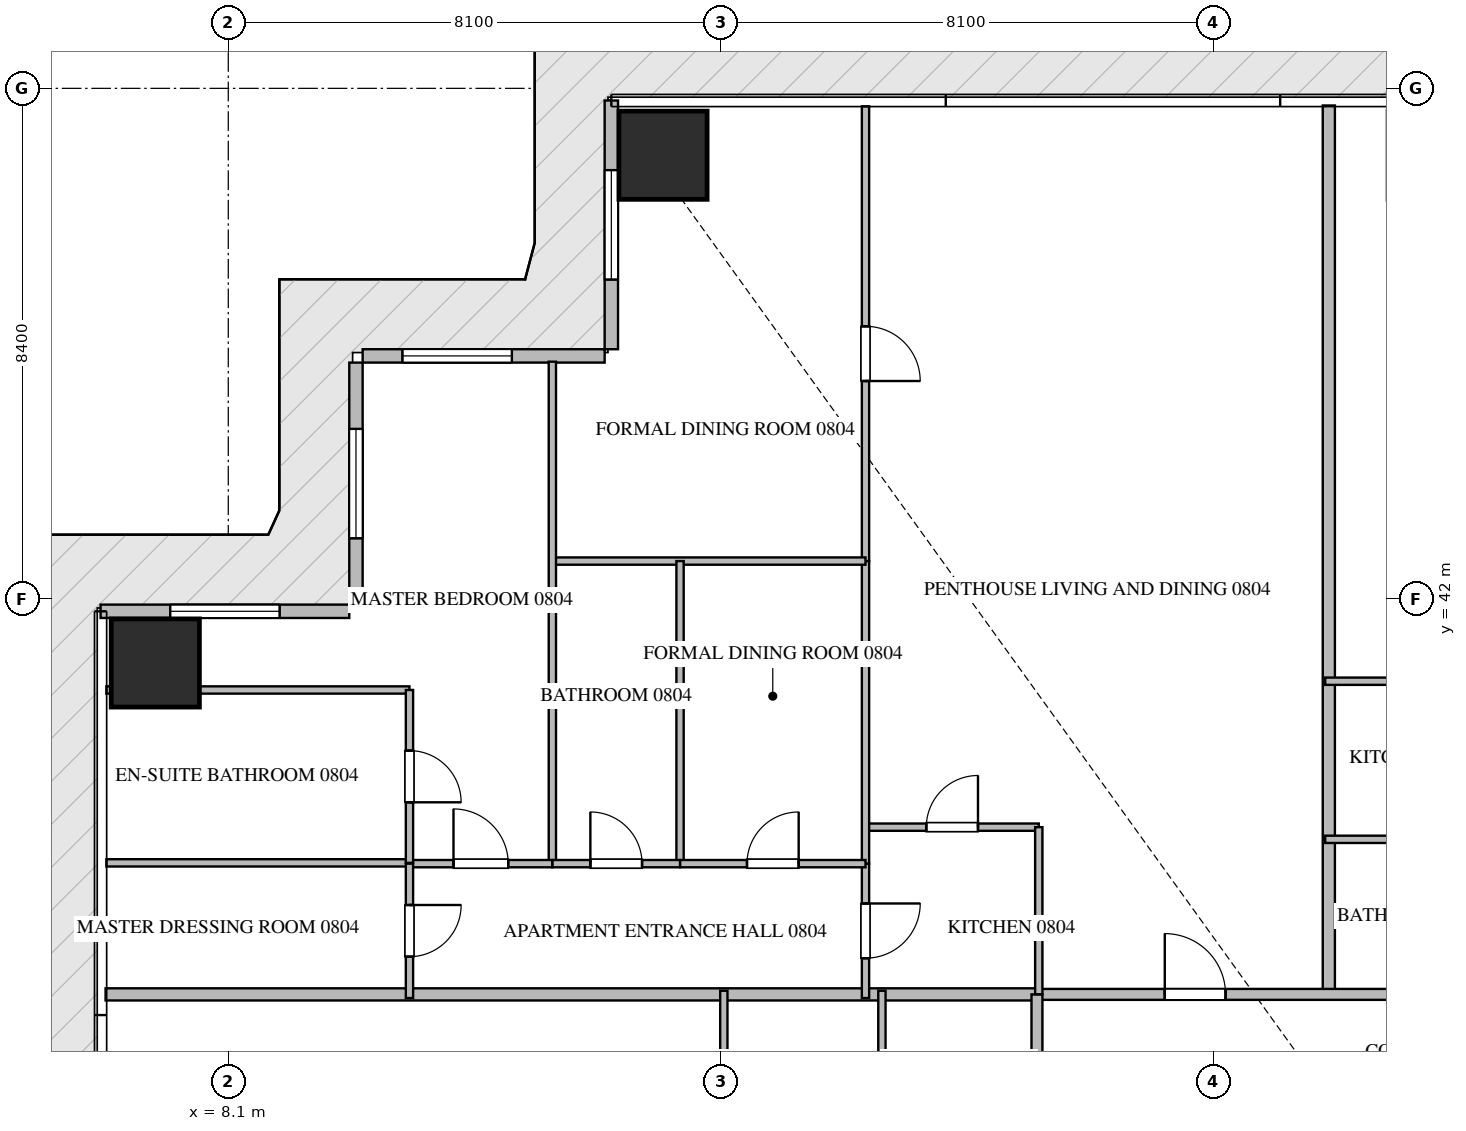
"""IFC4 building model, lengths in metres.
Left out: names, types, materials, properties, quantities, classifications, styles, units other than length and angle.
Written with IfcOpenShell. Run it as: python <this file> out.ifc"""

import sys

from ifc_helpers import new_model, si_unit, direction, frame, frame_2d, origin, origin_2d, place, context, subcontext, project, spatial, rectangle, extrude, source, transform, mapped, element, fill, save


model = new_model("IFC4")
c1 = context("Model", 3, precision=1e-05, world=origin(), true_north=direction((0.0, 1.0)))
c2 = subcontext(c1, "Body", "Model", "MODEL_VIEW")
j1 = project(units=[si_unit("LENGTHUNIT", "METRE"), si_unit("PLANEANGLEUNIT", "RADIAN")], contexts=[c1])
p1 = place(None, origin())
s1 = spatial("IfcSite", under=j1, at=p1, CompositionType="ELEMENT")
p2 = place(p1, origin())
s2 = spatial("IfcBuilding", under=s1, at=p2, CompositionType="ELEMENT")
p3 = place(p2, frame((0.0, 0.0, 37.95)))
s3 = spatial("IfcBuildingStorey", under=s2, at=p3, CompositionType="ELEMENT", Elevation=37.95)
m1 = source(origin(), c2, "Body", "SweptSolid", [
    extrude(rectangle(XDim=1.45, YDim=1.45, at=origin_2d()), origin(), (0.0, 0.0, 1.0), 3.75),
])
for number, where, z_axis, x_axis in (
    (1, (15.25, 49.3, -0.26), (0.0, 0.0, 1.0), (1.0, 0.0, 0.0)),
    (2, (6.9, 40.95, -0.26), (0.0, 0.0, 1.0), (1.0, 0.0, 0.0)),
):
    element("IfcColumn", number, at=place(p3, frame(where, z_axis=z_axis, x_axis=x_axis)), inside=s3, PredefinedType="COLUMN", context=c2, shape_type="MappedRepresentation", body=[
        mapped(m1, transform((0.0, 0.0, 0.0), scale=1.0)),
    ])
p4 = place(p3, frame((14.4, 50.2, 0.0), z_axis=(0.0, 0.0, 1.0), x_axis=(0.0, -1.0, 0.0)))
e3 = element("IfcWall", 3, at=p4, inside=s3, PredefinedType="ELEMENTEDWALL", context=c2, shape_type="SweptSolid", body=[
    extrude(rectangle(XDim=4.09, YDim=0.22, at=frame_2d((2.045, 0.0))), origin(), (0.0, 0.0, 1.0), 3.475),
])
p5 = place(p4, frame((1.145, 0.0, 0.65)))
e4 = element("IfcOpeningElement", 4, at=p5, cuts=e3, PredefinedType="OPENING", context=c2, shape_type="SweptSolid", body=[
    extrude(rectangle(XDim=1.8, YDim=2.1, at=frame_2d((0.9, 1.05))), frame((0.0, 0.12, 0.0), z_axis=(0.0, -1.0, 0.0), x_axis=(1.0, 0.0, 0.0)), (0.0, 0.0, 1.0), 0.24),
])
p6 = place(p3, frame((14.29, 46.0, 0.0), z_axis=(0.0, 0.0, 1.0), x_axis=(-1.0, 0.0, 0.0)))
e5 = element("IfcWall", 5, at=p6, inside=s3, PredefinedType="ELEMENTEDWALL", context=c2, shape_type="SweptSolid", body=[
    extrude(rectangle(XDim=3.98, YDim=0.22, at=frame_2d((1.99, 0.0))), origin(), (0.0, 0.0, 1.0), 3.475),
])
p7 = place(p6, frame((1.526, 0.0, 0.65)))
e6 = element("IfcOpeningElement", 6, at=p7, cuts=e5, PredefinedType="OPENING", context=c2, shape_type="SweptSolid", body=[
    extrude(rectangle(XDim=1.8, YDim=2.1, at=frame_2d((0.9, 1.05))), frame((0.0, 0.12, 0.0), z_axis=(0.0, -1.0, 0.0), x_axis=(1.0, 0.0, 0.0)), (0.0, 0.0, 1.0), 0.24),
])
p8 = place(p3, frame((10.2, 45.89, 0.0), z_axis=(0.0, 0.0, 1.0), x_axis=(0.0, -1.0, 0.0)))
e7 = element("IfcWall", 7, at=p8, inside=s3, PredefinedType="ELEMENTEDWALL", context=c2, shape_type="SweptSolid", body=[
    extrude(rectangle(XDim=3.98, YDim=0.22, at=frame_2d((1.99, 0.0))), origin(), (0.0, 0.0, 1.0), 3.475),
])
p9 = place(p8, frame((1.09, 0.0, 0.65)))
e8 = element("IfcOpeningElement", 8, at=p9, cuts=e7, PredefinedType="OPENING", context=c2, shape_type="SweptSolid", body=[
    extrude(rectangle(XDim=1.8, YDim=2.1, at=frame_2d((0.9, 1.05))), frame((0.0, 0.12, 0.0), z_axis=(0.0, -1.0, 0.0), x_axis=(1.0, 0.0, 0.0)), (0.0, 0.0, 1.0), 0.24),
])
p10 = place(p3, frame((10.09, 41.8, 0.0), z_axis=(0.0, 0.0, 1.0), x_axis=(-1.0, 0.0, 0.0)))
e9 = element("IfcWall", 9, at=p10, inside=s3, PredefinedType="ELEMENTEDWALL", context=c2, shape_type="SweptSolid", body=[
    extrude(rectangle(XDim=4.09, YDim=0.22, at=frame_2d((2.045, 0.0))), origin(), (0.0, 0.0, 1.0), 3.475),
])
p11 = place(p10, frame((1.145, 0.0, 0.65)))
e10 = element("IfcOpeningElement", 10, at=p11, cuts=e9, PredefinedType="OPENING", context=c2, shape_type="SweptSolid", body=[
    extrude(rectangle(XDim=1.8, YDim=2.1, at=frame_2d((0.9, 1.05))), frame((0.0, 0.12, 0.0), z_axis=(0.0, -1.0, 0.0), x_axis=(1.0, 0.0, 0.0)), (0.0, 0.0, 1.0), 0.24),
])
p12 = place(p3, frame((26.2, 35.5, 0.0), z_axis=(0.0, 0.0, 1.0), x_axis=(0.0, 1.0, 0.0)))
e11 = element("IfcWall", 11, at=p12, inside=s3, PredefinedType="PARTITIONING", context=c2, shape_type="SweptSolid", body=[
    extrude(rectangle(XDim=14.618, YDim=0.2, at=frame_2d((7.309, 0.0))), origin(), (0.0, 0.0, 1.0), 3.49),
])
p13 = place(p3, frame((6.082, 35.5, 0.0), z_axis=(0.0, 0.0, 1.0), x_axis=(1.0, 0.0, 0.0)))
e12 = element("IfcWall", 12, at=p13, inside=s3, PredefinedType="PARTITIONING", context=c2, shape_type="SweptSolid", body=[
    extrude(rectangle(XDim=15.318, YDim=0.2, at=frame_2d((7.659, 0.0))), origin(), (0.0, 0.0, 1.0), 3.49),
])
p14 = place(p3, frame((21.402, 35.5, 0.0), z_axis=(0.0, 0.0, 1.0), x_axis=(1.0, 0.0, 0.0)))
e13 = element("IfcWall", 13, at=p14, inside=s3, PredefinedType="PARTITIONING", context=c2, shape_type="SweptSolid", body=[
    extrude(rectangle(XDim=21.996, YDim=0.18, at=frame_2d((10.998, 0.0))), origin(), (0.0, 0.0, 1.0), 3.49),
])
p15 = place(p14, frame((2.1, 0.0, 0.0)))
e14 = element("IfcOpeningElement", 14, at=p15, cuts=e13, PredefinedType="OPENING", context=c2, shape_type="SweptSolid", body=[
    extrude(rectangle(XDim=1.0, YDim=2.15, at=frame_2d((0.5, 1.075))), frame((0.0, 0.1, 0.0), z_axis=(0.0, -1.0, 0.0), x_axis=(1.0, 0.0, 0.0)), (0.0, 0.0, 1.0), 0.2),
])
p16 = place(p14, frame((10.498, 0.0, 0.0)))
e15 = element("IfcOpeningElement", 15, at=p16, cuts=e13, PredefinedType="OPENING", context=c2, shape_type="SweptSolid", body=[
    extrude(rectangle(XDim=1.0, YDim=2.15, at=frame_2d((0.5, 1.075))), frame((0.0, 0.1, 0.0), z_axis=(0.0, -1.0, 0.0), x_axis=(1.0, 0.0, 0.0)), (0.0, 0.0, 1.0), 0.2),
])
p17 = place(p14, frame((16.272, 0.0, 0.0)))
e16 = element("IfcOpeningElement", 16, at=p17, cuts=e13, PredefinedType="OPENING", context=c2, shape_type="SweptSolid", body=[
    extrude(rectangle(XDim=1.0, YDim=2.15, at=frame_2d((0.5, 1.075))), frame((0.0, 0.1, 0.0), z_axis=(0.0, -1.0, 0.0), x_axis=(1.0, 0.0, 0.0)), (0.0, 0.0, 1.0), 0.2),
])
p18 = place(p3, frame((21.4, 14.9, 0.0), z_axis=(0.0, 0.0, 1.0), x_axis=(0.0, 1.0, 0.0)))
e17 = element("IfcWall", 17, at=p18, inside=s3, PredefinedType="PARTITIONING", context=c2, shape_type="SweptSolid", body=[
    extrude(rectangle(XDim=20.6, YDim=0.18, at=frame_2d((10.3, 0.0))), origin(), (0.0, 0.0, 1.0), 3.49),
])
p19 = place(p18, frame((1.96, 0.0, 0.0)))
e18 = element("IfcOpeningElement", 18, at=p19, cuts=e17, PredefinedType="OPENING", context=c2, shape_type="SweptSolid", body=[
    extrude(rectangle(XDim=1.0, YDim=2.15, at=frame_2d((0.5, 1.075))), frame((0.0, 0.1, 0.0), z_axis=(0.0, -1.0, 0.0), x_axis=(1.0, 0.0, 0.0)), (0.0, 0.0, 1.0), 0.2),
])
p20 = place(p18, frame((13.583, 0.0, 0.0)))
e19 = element("IfcOpeningElement", 19, at=p20, cuts=e17, PredefinedType="OPENING", context=c2, shape_type="SweptSolid", body=[
    extrude(rectangle(XDim=1.0, YDim=2.15, at=frame_2d((0.5, 1.075))), frame((0.0, 0.1, 0.0), z_axis=(0.0, -1.0, 0.0), x_axis=(1.0, 0.0, 0.0)), (0.0, 0.0, 1.0), 0.2),
])
p21 = place(p3, frame((18.58, 38.25, 0.0), z_axis=(0.0, 0.0, 1.0), x_axis=(1.0, 0.0, 0.0)))
e20 = element("IfcWall", 20, at=p21, inside=s3, PredefinedType="PARTITIONING", context=c2, shape_type="SweptSolid", body=[
    extrude(rectangle(XDim=2.85, YDim=0.12, at=frame_2d((1.425, 0.0))), origin(), (0.0, 0.0, 1.0), 3.49),
])
p22 = place(p21, frame((1.0, 0.0, 0.0)))
e21 = element("IfcOpeningElement", 21, at=p22, cuts=e20, PredefinedType="OPENING", context=c2, shape_type="SweptSolid", body=[
    extrude(rectangle(XDim=0.85, YDim=2.1, at=frame_2d((0.425, 1.05))), frame((0.0, 0.07, 0.0), z_axis=(0.0, -1.0, 0.0), x_axis=(1.0, 0.0, 0.0)), (0.0, 0.0, 1.0), 0.14),
])
p23 = place(p3, frame((21.43, 38.25, 0.0), z_axis=(0.0, 0.0, 1.0), x_axis=(0.0, -1.0, 0.0)))
e22 = element("IfcWall", 22, at=p23, inside=s3, PredefinedType="PARTITIONING", context=c2, shape_type="SweptSolid", body=[
    extrude(rectangle(XDim=2.748, YDim=0.12, at=frame_2d((1.374, 0.0))), origin(), (0.0, 0.0, 1.0), 3.49),
])
p24 = place(p3, frame((18.58, 37.65, 0.0), z_axis=(0.0, 0.0, 1.0), x_axis=(0.0, -1.0, 0.0)))
e23 = element("IfcWall", 23, at=p24, inside=s3, PredefinedType="PARTITIONING", context=c2, shape_type="SweptSolid", body=[
    extrude(rectangle(XDim=2.21, YDim=0.12, at=frame_2d((1.105, 0.0))), origin(), (0.0, 0.0, 1.0), 3.49),
])
p25 = place(p24, frame((0.655, 0.0, 0.0)))
e24 = element("IfcOpeningElement", 24, at=p25, cuts=e23, PredefinedType="OPENING", context=c2, shape_type="SweptSolid", body=[
    extrude(rectangle(XDim=0.9, YDim=2.1, at=frame_2d((0.45, 1.05))), frame((0.0, 0.07, 0.0), z_axis=(0.0, -1.0, 0.0), x_axis=(1.0, 0.0, 0.0)), (0.0, 0.0, 1.0), 0.14),
])
p26 = place(p3, frame((18.58, 50.105, 0.0), z_axis=(0.0, 0.0, 1.0), x_axis=(0.0, -1.0, 0.0)))
e25 = element("IfcWall", 25, at=p26, inside=s3, PredefinedType="PARTITIONING", context=c2, shape_type="SweptSolid", body=[
    extrude(rectangle(XDim=7.479, YDim=0.12, at=frame_2d((3.74, 0.0))), origin(), (0.0, 0.0, 1.0), 3.49),
])
p27 = place(p26, frame((3.618, 0.0, 0.0)))
e26 = element("IfcOpeningElement", 26, at=p27, cuts=e25, PredefinedType="OPENING", context=c2, shape_type="SweptSolid", body=[
    extrude(rectangle(XDim=0.9, YDim=2.1, at=frame_2d((0.45, 1.05))), frame((0.0, 0.07, 0.0), z_axis=(0.0, -1.0, 0.0), x_axis=(1.0, 0.0, 0.0)), (0.0, 0.0, 1.0), 0.14),
])
p28 = place(p3, frame((18.58, 42.624, 0.0), z_axis=(0.0, 0.0, 1.0), x_axis=(0.0, -1.0, 0.0)))
e27 = element("IfcWall", 27, at=p28, inside=s3, PredefinedType="PARTITIONING", context=c2, shape_type="SweptSolid", body=[
    extrude(rectangle(XDim=4.972, YDim=0.12, at=frame_2d((2.486, 0.0))), origin(), (0.0, 0.0, 1.0), 3.49),
])
p29 = place(p3, frame((13.43, 42.626, 0.0), z_axis=(0.0, 0.0, 1.0), x_axis=(1.0, 0.0, 0.0)))
e28 = element("IfcWall", 28, at=p29, inside=s3, PredefinedType="PARTITIONING", context=c2, shape_type="SweptSolid", body=[
    extrude(rectangle(XDim=5.15, YDim=0.12, at=frame_2d((2.575, 0.0))), origin(), (0.0, 0.0, 1.0), 3.49),
])
p30 = place(p3, frame((13.43, 45.905, 0.0), z_axis=(0.0, 0.0, 1.0), x_axis=(0.0, -1.0, 0.0)))
e29 = element("IfcWall", 29, at=p30, inside=s3, PredefinedType="PARTITIONING", context=c2, shape_type="SweptSolid", body=[
    extrude(rectangle(XDim=8.255, YDim=0.12, at=frame_2d((4.127, 0.0))), origin(), (0.0, 0.0, 1.0), 3.49),
])
p31 = place(p3, frame((15.53, 42.626, 0.0), z_axis=(0.0, 0.0, 1.0), x_axis=(0.0, -1.0, 0.0)))
e30 = element("IfcWall", 30, at=p31, inside=s3, PredefinedType="PARTITIONING", context=c2, shape_type="SweptSolid", body=[
    extrude(rectangle(XDim=4.976, YDim=0.12, at=frame_2d((2.488, 0.0))), origin(), (0.0, 0.0, 1.0), 3.49),
])
p32 = place(p3, frame((13.43, 37.65, 0.0), z_axis=(0.0, 0.0, 1.0), x_axis=(1.0, 0.0, 0.0)))
e31 = element("IfcWall", 31, at=p32, inside=s3, PredefinedType="PARTITIONING", context=c2, shape_type="SweptSolid", body=[
    extrude(rectangle(XDim=2.1, YDim=0.12, at=frame_2d((1.05, 0.0))), origin(), (0.0, 0.0, 1.0), 3.49),
])
p33 = place(p32, frame((0.625, 0.0, 0.0)))
e32 = element("IfcOpeningElement", 32, at=p33, cuts=e31, PredefinedType="OPENING", context=c2, shape_type="SweptSolid", body=[
    extrude(rectangle(XDim=0.85, YDim=2.1, at=frame_2d((0.425, 1.05))), frame((0.0, 0.07, 0.0), z_axis=(0.0, -1.0, 0.0), x_axis=(1.0, 0.0, 0.0)), (0.0, 0.0, 1.0), 0.14),
])
p34 = place(p3, frame((15.532, 37.65, 0.0), z_axis=(0.0, 0.0, 1.0), x_axis=(1.0, 0.0, 0.0)))
e33 = element("IfcWall", 33, at=p34, inside=s3, PredefinedType="PARTITIONING", context=c2, shape_type="SweptSolid", body=[
    extrude(rectangle(XDim=3.048, YDim=0.12, at=frame_2d((1.524, 0.0))), origin(), (0.0, 0.0, 1.0), 3.49),
])
p35 = place(p34, frame((1.099, 0.0, 0.0)))
e34 = element("IfcOpeningElement", 34, at=p35, cuts=e33, PredefinedType="OPENING", context=c2, shape_type="SweptSolid", body=[
    extrude(rectangle(XDim=0.85, YDim=2.1, at=frame_2d((0.425, 1.05))), frame((0.0, 0.07, 0.0), z_axis=(0.0, -1.0, 0.0), x_axis=(1.0, 0.0, 0.0)), (0.0, 0.0, 1.0), 0.14),
])
p36 = place(p3, frame((11.08, 37.65, 0.0), z_axis=(0.0, 0.0, 1.0), x_axis=(1.0, 0.0, 0.0)))
e35 = element("IfcWall", 35, at=p36, inside=s3, PredefinedType="PARTITIONING", context=c2, shape_type="SweptSolid", body=[
    extrude(rectangle(XDim=2.348, YDim=0.12, at=frame_2d((1.174, 0.0))), origin(), (0.0, 0.0, 1.0), 3.49),
])
p37 = place(p36, frame((0.724, 0.0, 0.0)))
e36 = element("IfcOpeningElement", 36, at=p37, cuts=e35, PredefinedType="OPENING", context=c2, shape_type="SweptSolid", body=[
    extrude(rectangle(XDim=0.9, YDim=2.1, at=frame_2d((0.45, 1.05))), frame((0.0, 0.07, 0.0), z_axis=(0.0, -1.0, 0.0), x_axis=(1.0, 0.0, 0.0)), (0.0, 0.0, 1.0), 0.14),
])
p38 = place(p3, frame((6.095, 40.506, 0.0), z_axis=(0.0, 0.0, 1.0), x_axis=(1.0, 0.0, 0.0)))
e37 = element("IfcWall", 37, at=p38, inside=s3, PredefinedType="PARTITIONING", context=c2, shape_type="SweptSolid", body=[
    extrude(rectangle(XDim=4.985, YDim=0.12, at=frame_2d((2.493, 0.0))), origin(), (0.0, 0.0, 1.0), 3.49),
])
p39 = place(p3, frame((6.095, 37.663, 0.0), z_axis=(0.0, 0.0, 1.0), x_axis=(1.0, 0.0, 0.0)))
e38 = element("IfcWall", 38, at=p39, inside=s3, PredefinedType="PARTITIONING", context=c2, shape_type="SweptSolid", body=[
    extrude(rectangle(XDim=4.983, YDim=0.12, at=frame_2d((2.491, 0.0))), origin(), (0.0, 0.0, 1.0), 3.49),
])
p40 = place(p3, frame((11.08, 40.506, 0.0), z_axis=(0.0, 0.0, 1.0), x_axis=(0.0, -1.0, 0.0)))
e39 = element("IfcWall", 39, at=p40, inside=s3, PredefinedType="PARTITIONING", context=c2, shape_type="SweptSolid", body=[
    extrude(rectangle(XDim=2.843, YDim=0.12, at=frame_2d((1.421, 0.0))), origin(), (0.0, 0.0, 1.0), 3.49),
])
p41 = place(p40, frame((0.997, 0.0, 0.0)))
e40 = element("IfcOpeningElement", 40, at=p41, cuts=e39, PredefinedType="OPENING", context=c2, shape_type="SweptSolid", body=[
    extrude(rectangle(XDim=0.85, YDim=2.1, at=frame_2d((0.425, 1.05))), frame((0.0, 0.07, 0.0), z_axis=(0.0, -1.0, 0.0), x_axis=(1.0, 0.0, 0.0)), (0.0, 0.0, 1.0), 0.14),
])
p42 = place(p3, frame((11.08, 37.65, 0.0), z_axis=(0.0, 0.0, 1.0), x_axis=(0.0, -1.0, 0.0)))
e41 = element("IfcWall", 41, at=p42, inside=s3, PredefinedType="PARTITIONING", context=c2, shape_type="SweptSolid", body=[
    extrude(rectangle(XDim=2.21, YDim=0.12, at=frame_2d((1.105, 0.0))), origin(), (0.0, 0.0, 1.0), 3.49),
])
p43 = place(p42, frame((0.68, 0.0, 0.0)))
e42 = element("IfcOpeningElement", 42, at=p43, cuts=e41, PredefinedType="OPENING", context=c2, shape_type="SweptSolid", body=[
    extrude(rectangle(XDim=0.85, YDim=2.1, at=frame_2d((0.425, 1.05))), frame((0.0, 0.07, 0.0), z_axis=(0.0, -1.0, 0.0), x_axis=(1.0, 0.0, 0.0)), (0.0, 0.0, 1.0), 0.14),
])
for number, where, z_axis, x_axis in (
    (43, (26.14, 38.05, 0.0), (0.0, 0.0, 1.0), (1.0, 0.0, 0.0)),
    (44, (26.14, 40.65, 0.0), (0.0, 0.0, 1.0), (1.0, 0.0, 0.0)),
):
    element("IfcWall", number, at=place(p3, frame(where, z_axis=z_axis, x_axis=x_axis)), inside=s3, PredefinedType="PARTITIONING", context=c2, shape_type="SweptSolid", body=[
        extrude(rectangle(XDim=3.36, YDim=0.12, at=frame_2d((1.68, 0.0))), origin(), (0.0, 0.0, 1.0), 3.49),
    ])
for number, where, z_axis, x_axis in (
    (45, (18.85, 32.75, 0.0), (0.0, 0.0, 1.0), (0.0, 1.0, 0.0)),
    (46, (16.25, 32.75, 0.0), (0.0, 0.0, 1.0), (0.0, 1.0, 0.0)),
):
    element("IfcWall", number, at=place(p3, frame(where, z_axis=z_axis, x_axis=x_axis)), inside=s3, PredefinedType="PARTITIONING", context=c2, shape_type="SweptSolid", body=[
        extrude(rectangle(XDim=2.81, YDim=0.12, at=frame_2d((1.405, 0.0))), origin(), (0.0, 0.0, 1.0), 3.49),
    ])
m2 = source(origin(), c2, "Body", "SweptSolid", [
    extrude(rectangle(XDim=1.8, YDim=2.1, at=frame_2d((0.9, 1.05))), frame((0.0, 0.03, 0.0), z_axis=(0.0, -1.0, 0.0), x_axis=(1.0, 0.0, 0.0)), (0.0, 0.0, 1.0), 0.06),
])
p44 = place(p5, origin())
e47 = element("IfcWindow", 47, at=p44, inside=s3, PartitioningType="SINGLE_PANEL", PredefinedType="WINDOW", context=c2, shape_type="MappedRepresentation", body=[
    mapped(m2, transform((0.0, 0.0, 0.0), scale=1.0)),
])
fill(e4, e47)
p45 = place(p7, origin())
e48 = element("IfcWindow", 48, at=p45, inside=s3, PartitioningType="SINGLE_PANEL", PredefinedType="WINDOW", context=c2, shape_type="MappedRepresentation", body=[
    mapped(m2, transform((0.0, 0.0, 0.0), scale=1.0)),
])
fill(e6, e48)
p46 = place(p9, origin())
e49 = element("IfcWindow", 49, at=p46, inside=s3, PartitioningType="SINGLE_PANEL", PredefinedType="WINDOW", context=c2, shape_type="MappedRepresentation", body=[
    mapped(m2, transform((0.0, 0.0, 0.0), scale=1.0)),
])
fill(e8, e49)
p47 = place(p11, origin())
e50 = element("IfcWindow", 50, at=p47, inside=s3, PartitioningType="SINGLE_PANEL", PredefinedType="WINDOW", context=c2, shape_type="MappedRepresentation", body=[
    mapped(m2, transform((0.0, 0.0, 0.0), scale=1.0)),
])
fill(e10, e50)
m3 = source(origin(), c2, "Body", "SweptSolid", [
    extrude(rectangle(XDim=1.0, YDim=2.15, at=frame_2d((0.5, 1.075))), frame((0.0, 0.025, 0.0), z_axis=(0.0, -1.0, 0.0), x_axis=(1.0, 0.0, 0.0)), (0.0, 0.0, 1.0), 0.05),
])
p48 = place(p15, origin())
e51 = element("IfcDoor", 51, at=p48, inside=s3, OperationType="SINGLE_SWING_LEFT", PredefinedType="DOOR", context=c2, shape_type="MappedRepresentation", body=[
    mapped(m3, transform((0.0, 0.0, 0.0), scale=1.0)),
])
fill(e14, e51)
m4 = source(origin(), c2, "Body", "SweptSolid", [
    extrude(rectangle(XDim=0.85, YDim=2.1, at=frame_2d((0.425, 1.05))), frame((0.0, 0.025, 0.0), z_axis=(0.0, -1.0, 0.0), x_axis=(1.0, 0.0, 0.0)), (0.0, 0.0, 1.0), 0.05),
])
p49 = place(p22, origin())
e52 = element("IfcDoor", 52, at=p49, inside=s3, OperationType="SINGLE_SWING_RIGHT", PredefinedType="DOOR", context=c2, shape_type="MappedRepresentation", body=[
    mapped(m4, transform((0.0, 0.0, 0.0), scale=1.0)),
])
fill(e21, e52)
m5 = source(origin(), c2, "Body", "SweptSolid", [
    extrude(rectangle(XDim=0.9, YDim=2.1, at=frame_2d((0.45, 1.05))), frame((0.0, 0.025, 0.0), z_axis=(0.0, -1.0, 0.0), x_axis=(1.0, 0.0, 0.0)), (0.0, 0.0, 1.0), 0.05),
])
p50 = place(p25, origin())
e53 = element("IfcDoor", 53, at=p50, inside=s3, OperationType="SINGLE_SWING_LEFT", PredefinedType="DOOR", context=c2, shape_type="MappedRepresentation", body=[
    mapped(m5, transform((0.0, 0.0, 0.0), scale=1.0)),
])
fill(e24, e53)
p51 = place(p27, origin())
e54 = element("IfcDoor", 54, at=p51, inside=s3, OperationType="SINGLE_SWING_RIGHT", PredefinedType="DOOR", context=c2, shape_type="MappedRepresentation", body=[
    mapped(m5, transform((0.0, 0.0, 0.0), scale=1.0)),
])
fill(e26, e54)
p52 = place(p33, origin())
e55 = element("IfcDoor", 55, at=p52, inside=s3, OperationType="SINGLE_SWING_LEFT", PredefinedType="DOOR", context=c2, shape_type="MappedRepresentation", body=[
    mapped(m4, transform((0.0, 0.0, 0.0), scale=1.0)),
])
fill(e32, e55)
p53 = place(p35, origin())
e56 = element("IfcDoor", 56, at=p53, inside=s3, OperationType="SINGLE_SWING_RIGHT", PredefinedType="DOOR", context=c2, shape_type="MappedRepresentation", body=[
    mapped(m4, transform((0.0, 0.0, 0.0), scale=1.0)),
])
fill(e34, e56)
p54 = place(p37, origin())
e57 = element("IfcDoor", 57, at=p54, inside=s3, OperationType="SINGLE_SWING_LEFT", PredefinedType="DOOR", context=c2, shape_type="MappedRepresentation", body=[
    mapped(m5, transform((0.0, 0.0, 0.0), scale=1.0)),
])
fill(e36, e57)
p55 = place(p41, origin())
e58 = element("IfcDoor", 58, at=p55, inside=s3, OperationType="SINGLE_SWING_RIGHT", PredefinedType="DOOR", context=c2, shape_type="MappedRepresentation", body=[
    mapped(m4, transform((0.0, 0.0, 0.0), scale=1.0)),
])
fill(e40, e58)
p56 = place(p43, origin())
e59 = element("IfcDoor", 59, at=p56, inside=s3, OperationType="SINGLE_SWING_LEFT", PredefinedType="DOOR", context=c2, shape_type="MappedRepresentation", body=[
    mapped(m4, transform((0.0, 0.0, 0.0), scale=1.0)),
])
fill(e42, e59)
save(model, sys.argv[1])
